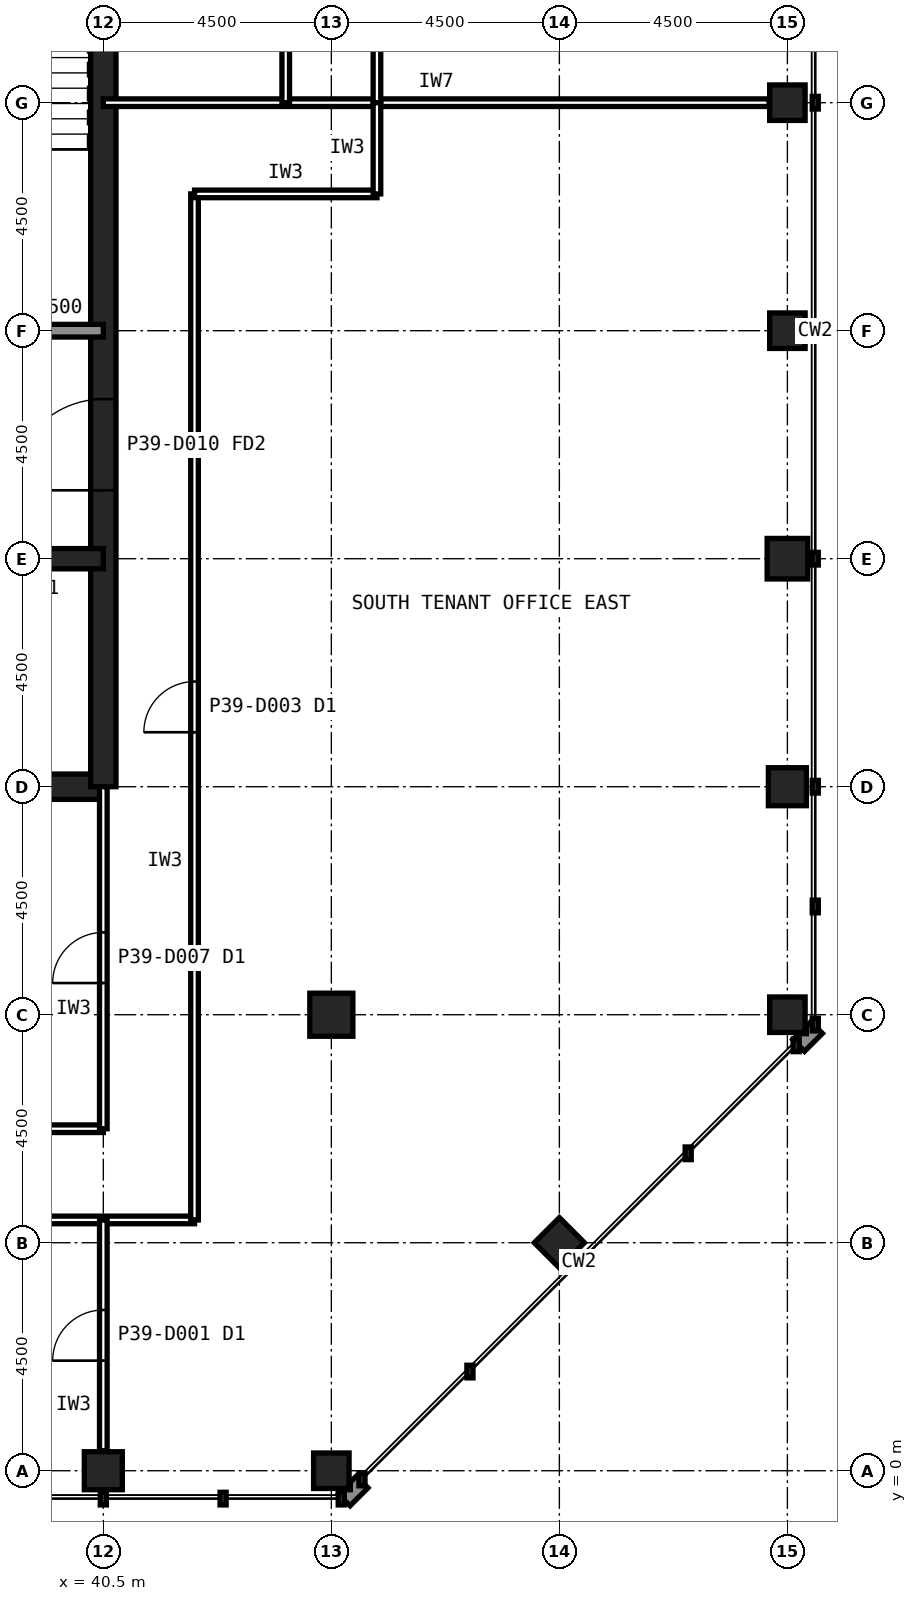
"""IFC4 building model, lengths in metres.
Left out: names, types, materials, properties, quantities, classifications, styles, units other than length and angle.
Written with IfcOpenShell. Run it as: python <this file> out.ifc"""

import sys

from ifc_helpers import new_model, si_unit, direction, frame, frame_2d, origin, origin_2d, place, context, subcontext, project, spatial, rectangle, hollow_rectangle, extrude, element, fill, save


model = new_model("IFC4")
c1 = context("Model", 3, precision=1e-05, world=origin(), true_north=direction((0.0, 1.0)))
c2 = subcontext(c1, "Body", "Model", "MODEL_VIEW")
j1 = project(units=[si_unit("LENGTHUNIT", "METRE"), si_unit("PLANEANGLEUNIT", "RADIAN")], contexts=[c1])
p1 = place(None, origin())
s1 = spatial("IfcSite", under=j1, at=p1, CompositionType="ELEMENT")
p2 = place(p1, origin())
s2 = spatial("IfcBuilding", under=s1, at=p2, CompositionType="ELEMENT")
p3 = place(p2, frame((0.0, 0.0, 167.6)))
s3 = spatial("IfcBuildingStorey", under=s2, at=p3, CompositionType="ELEMENT", Elevation=167.6)
p4 = place(p3, frame((40.5, 0.0, 0.0), z_axis=(0.0, 0.0, 1.0), x_axis=(1.0, 0.0, 0.0)))
e1 = element("IfcColumn", 1, at=p4, inside=s3, PredefinedType="COLUMN", context=c2, shape_type="SweptSolid", body=[
    extrude(hollow_rectangle(XDim=0.75, YDim=0.75, WallThickness=0.04, at=origin_2d()), origin(), (0.0, 0.0, 1.0), 4.0),
])
for number, where, z_axis, x_axis in (
    (2, (45.0, 0.0, 0.0), (0.0, 0.0, 1.0), (1.0, 0.0, 0.0)),
    (3, (54.0, 9.0, 0.0), (0.0, 0.0, 1.0), (1.0, 0.0, 0.0)),
):
    element("IfcColumn", number, at=place(p3, frame(where, z_axis=z_axis, x_axis=x_axis)), inside=s3, PredefinedType="COLUMN", context=c2, shape_type="SweptSolid", body=[
        extrude(hollow_rectangle(XDim=0.7, YDim=0.7, WallThickness=0.036, at=origin_2d()), origin(), (0.0, 0.0, 1.0), 4.0),
    ])
p5 = place(p3, frame((54.0, 13.5, 0.0), z_axis=(0.0, 0.0, 1.0), x_axis=(1.0, 0.0, 0.0)))
e4 = element("IfcColumn", 4, at=p5, inside=s3, PredefinedType="COLUMN", context=c2, shape_type="SweptSolid", body=[
    extrude(hollow_rectangle(XDim=0.75, YDim=0.75, WallThickness=0.04, at=origin_2d()), origin(), (0.0, 0.0, 1.0), 4.0),
])
p6 = place(p3, frame((54.0, 18.0, 0.0), z_axis=(0.0, 0.0, 1.0), x_axis=(1.0, 0.0, 0.0)))
e5 = element("IfcColumn", 5, at=p6, inside=s3, PredefinedType="COLUMN", context=c2, shape_type="SweptSolid", body=[
    extrude(hollow_rectangle(XDim=0.8, YDim=0.8, WallThickness=0.045, at=origin_2d()), origin(), (0.0, 0.0, 1.0), 4.0),
])
for number, where, z_axis, x_axis in (
    (6, (54.0, 22.5, 0.0), (0.0, 0.0, 1.0), (1.0, 0.0, 0.0)),
    (7, (54.0, 27.0, 0.0), (0.0, 0.0, 1.0), (1.0, 0.0, 0.0)),
    (8, (49.5, 4.5, 0.0), (0.0, 0.0, 1.0), (0.707, 0.707, 0.0)),
):
    element("IfcColumn", number, at=place(p3, frame(where, z_axis=z_axis, x_axis=x_axis)), inside=s3, PredefinedType="COLUMN", context=c2, shape_type="SweptSolid", body=[
        extrude(hollow_rectangle(XDim=0.7, YDim=0.7, WallThickness=0.036, at=origin_2d()), origin(), (0.0, 0.0, 1.0), 4.0),
    ])
p7 = place(p3, frame((45.0, 9.0, 0.0), z_axis=(0.0, 0.0, 1.0), x_axis=(1.0, 0.0, 0.0)))
e9 = element("IfcColumn", 9, at=p7, inside=s3, PredefinedType="COLUMN", context=c2, shape_type="SweptSolid", body=[
    extrude(hollow_rectangle(XDim=0.85, YDim=0.85, WallThickness=0.05, at=origin_2d()), origin(), (0.0, 0.0, 1.0), 4.0),
])
p8 = place(p3, frame((13.5, 13.5, 0.0), z_axis=(0.0, 0.0, 1.0), x_axis=(1.0, 0.0, 0.0)))
e10 = element("IfcWall", 10, at=p8, inside=s3, PredefinedType="SHEAR", context=c2, shape_type="SweptSolid", body=[
    extrude(rectangle(XDim=27.0, YDim=0.5, at=frame_2d((13.5, 0.0))), origin(), (0.0, 0.0, 1.0), 4.0),
])
p9 = place(p3, frame((40.5, 13.5, 0.0), z_axis=(0.0, 0.0, 1.0), x_axis=(0.0, 1.0, 0.0)))
e11 = element("IfcWall", 11, at=p9, inside=s3, PredefinedType="SHEAR", context=c2, shape_type="SweptSolid", body=[
    extrude(rectangle(XDim=27.0, YDim=0.5, at=frame_2d((13.5, 0.0))), origin(), (0.0, 0.0, 1.0), 4.0),
])
p10 = place(p9, frame((5.85, 0.0, 0.0)))
e12 = element("IfcOpeningElement", 12, at=p10, cuts=e11, PredefinedType="OPENING", context=c2, shape_type="SweptSolid", body=[
    extrude(rectangle(XDim=1.8, YDim=2.1, at=frame_2d((0.9, 1.05))), frame((0.0, 0.26, 0.0), z_axis=(0.0, -1.0, 0.0), x_axis=(1.0, 0.0, 0.0)), (0.0, 0.0, 1.0), 0.52),
])
p11 = place(p9, frame((19.65, 0.0, 0.0)))
e13 = element("IfcOpeningElement", 13, at=p11, cuts=e11, PredefinedType="OPENING", context=c2, shape_type="SweptSolid", body=[
    extrude(rectangle(XDim=1.2, YDim=2.1, at=frame_2d((0.6, 1.05))), frame((0.0, 0.26, 0.0), z_axis=(0.0, -1.0, 0.0), x_axis=(1.0, 0.0, 0.0)), (0.0, 0.0, 1.0), 0.52),
])
p12 = place(p3, frame((13.5, 18.0, 0.0), z_axis=(0.0, 0.0, 1.0), x_axis=(1.0, 0.0, 0.0)))
e14 = element("IfcWall", 14, at=p12, inside=s3, PredefinedType="SHEAR", context=c2, shape_type="SweptSolid", body=[
    extrude(rectangle(XDim=27.0, YDim=0.4, at=frame_2d((13.5, 0.0))), origin(), (0.0, 0.0, 1.0), 4.0),
])
p13 = place(p12, frame((24.3, 0.0, 0.0)))
e15 = element("IfcOpeningElement", 15, at=p13, cuts=e14, PredefinedType="OPENING", context=c2, shape_type="SweptSolid", body=[
    extrude(rectangle(XDim=0.9, YDim=2.1, at=frame_2d((0.45, 1.05))), frame((0.0, 0.21, 0.0), z_axis=(0.0, -1.0, 0.0), x_axis=(1.0, 0.0, 0.0)), (0.0, 0.0, 1.0), 0.42),
])
p14 = place(p12, frame((5.45, 0.0, 0.0)))
e16 = element("IfcOpeningElement", 16, at=p14, cuts=e14, PredefinedType="OPENING", context=c2, shape_type="SweptSolid", body=[
    extrude(rectangle(XDim=1.1, YDim=2.1, at=frame_2d((0.55, 1.05))), frame((0.0, 0.21, 0.0), z_axis=(0.0, -1.0, 0.0), x_axis=(1.0, 0.0, 0.0)), (0.0, 0.0, 1.0), 0.42),
])
p15 = place(p12, frame((8.45, 0.0, 0.0)))
e17 = element("IfcOpeningElement", 17, at=p15, cuts=e14, PredefinedType="OPENING", context=c2, shape_type="SweptSolid", body=[
    extrude(rectangle(XDim=1.1, YDim=2.1, at=frame_2d((0.55, 1.05))), frame((0.0, 0.21, 0.0), z_axis=(0.0, -1.0, 0.0), x_axis=(1.0, 0.0, 0.0)), (0.0, 0.0, 1.0), 0.42),
])
p16 = place(p12, frame((11.45, 0.0, 0.0)))
e18 = element("IfcOpeningElement", 18, at=p16, cuts=e14, PredefinedType="OPENING", context=c2, shape_type="SweptSolid", body=[
    extrude(rectangle(XDim=1.1, YDim=2.1, at=frame_2d((0.55, 1.05))), frame((0.0, 0.21, 0.0), z_axis=(0.0, -1.0, 0.0), x_axis=(1.0, 0.0, 0.0)), (0.0, 0.0, 1.0), 0.42),
])
p17 = place(p12, frame((14.45, 0.0, 0.0)))
e19 = element("IfcOpeningElement", 19, at=p17, cuts=e14, PredefinedType="OPENING", context=c2, shape_type="SweptSolid", body=[
    extrude(rectangle(XDim=1.1, YDim=2.1, at=frame_2d((0.55, 1.05))), frame((0.0, 0.21, 0.0), z_axis=(0.0, -1.0, 0.0), x_axis=(1.0, 0.0, 0.0)), (0.0, 0.0, 1.0), 0.42),
])
p18 = place(p12, frame((17.45, 0.0, 0.0)))
e20 = element("IfcOpeningElement", 20, at=p18, cuts=e14, PredefinedType="OPENING", context=c2, shape_type="SweptSolid", body=[
    extrude(rectangle(XDim=1.1, YDim=2.1, at=frame_2d((0.55, 1.05))), frame((0.0, 0.21, 0.0), z_axis=(0.0, -1.0, 0.0), x_axis=(1.0, 0.0, 0.0)), (0.0, 0.0, 1.0), 0.42),
])
p19 = place(p12, frame((20.45, 0.0, 0.0)))
e21 = element("IfcOpeningElement", 21, at=p19, cuts=e14, PredefinedType="OPENING", context=c2, shape_type="SweptSolid", body=[
    extrude(rectangle(XDim=1.1, YDim=2.1, at=frame_2d((0.55, 1.05))), frame((0.0, 0.21, 0.0), z_axis=(0.0, -1.0, 0.0), x_axis=(1.0, 0.0, 0.0)), (0.0, 0.0, 1.0), 0.42),
])
p20 = place(p12, frame((1.6, 0.0, 0.0)))
e22 = element("IfcOpeningElement", 22, at=p20, cuts=e14, PredefinedType="OPENING", context=c2, shape_type="SweptSolid", body=[
    extrude(rectangle(XDim=1.3, YDim=2.2, at=frame_2d((0.65, 1.1))), frame((0.0, 0.21, 0.0), z_axis=(0.0, -1.0, 0.0), x_axis=(1.0, 0.0, 0.0)), (0.0, 0.0, 1.0), 0.42),
])
p21 = place(p3, frame((13.5, 22.5, 0.0), z_axis=(0.0, 0.0, 1.0), x_axis=(1.0, 0.0, 0.0)))
e23 = element("IfcWall", 23, at=p21, inside=s3, PredefinedType="SOLIDWALL", context=c2, shape_type="SweptSolid", body=[
    extrude(rectangle(XDim=27.0, YDim=0.25, at=frame_2d((13.5, 0.0))), origin(), (0.0, 0.0, 1.0), 3.84),
])
p22 = place(p21, frame((1.65, 0.0, 0.0)))
e24 = element("IfcOpeningElement", 24, at=p22, cuts=e23, PredefinedType="OPENING", context=c2, shape_type="SweptSolid", body=[
    extrude(rectangle(XDim=1.2, YDim=2.1, at=frame_2d((0.6, 1.05))), frame((0.0, 0.135, 0.0), z_axis=(0.0, -1.0, 0.0), x_axis=(1.0, 0.0, 0.0)), (0.0, 0.0, 1.0), 0.27),
])
p23 = place(p21, frame((6.025, 0.0, 0.0)))
e25 = element("IfcOpeningElement", 25, at=p23, cuts=e23, PredefinedType="OPENING", context=c2, shape_type="SweptSolid", body=[
    extrude(rectangle(XDim=1.0, YDim=2.1, at=frame_2d((0.5, 1.05))), frame((0.0, 0.135, 0.0), z_axis=(0.0, -1.0, 0.0), x_axis=(1.0, 0.0, 0.0)), (0.0, 0.0, 1.0), 0.27),
])
p24 = place(p21, frame((10.525, 0.0, 0.0)))
e26 = element("IfcOpeningElement", 26, at=p24, cuts=e23, PredefinedType="OPENING", context=c2, shape_type="SweptSolid", body=[
    extrude(rectangle(XDim=1.0, YDim=2.1, at=frame_2d((0.5, 1.05))), frame((0.0, 0.135, 0.0), z_axis=(0.0, -1.0, 0.0), x_axis=(1.0, 0.0, 0.0)), (0.0, 0.0, 1.0), 0.27),
])
p25 = place(p21, frame((19.75, 0.0, 0.0)))
e27 = element("IfcOpeningElement", 27, at=p25, cuts=e23, PredefinedType="OPENING", context=c2, shape_type="SweptSolid", body=[
    extrude(rectangle(XDim=1.0, YDim=2.1, at=frame_2d((0.5, 1.05))), frame((0.0, 0.135, 0.0), z_axis=(0.0, -1.0, 0.0), x_axis=(1.0, 0.0, 0.0)), (0.0, 0.0, 1.0), 0.27),
])
p26 = place(p21, frame((15.05, 0.0, 0.0)))
e28 = element("IfcOpeningElement", 28, at=p26, cuts=e23, PredefinedType="OPENING", context=c2, shape_type="SweptSolid", body=[
    extrude(rectangle(XDim=1.4, YDim=2.4, at=frame_2d((0.7, 1.2))), frame((0.0, 0.135, 0.0), z_axis=(0.0, -1.0, 0.0), x_axis=(1.0, 0.0, 0.0)), (0.0, 0.0, 1.0), 0.27),
])
p27 = place(p3, frame((40.5, 27.0, 0.0), z_axis=(0.0, 0.0, 1.0), x_axis=(1.0, 0.0, 0.0)))
e29 = element("IfcWall", 29, at=p27, inside=s3, PredefinedType="PARTITIONING", context=c2, shape_type="SweptSolid", body=[
    extrude(rectangle(XDim=13.14, YDim=0.15, at=frame_2d((6.57, 0.0))), origin(), (0.0, 0.0, 1.0), 2.989),
])
p28 = place(p3, frame((45.9, 27.0, 0.0), z_axis=(0.0, 0.0, 1.0), x_axis=(0.0, 1.0, 0.0)))
e30 = element("IfcWall", 30, at=p28, inside=s3, PredefinedType="PARTITIONING", context=c2, shape_type="SweptSolid", body=[
    extrude(rectangle(XDim=6.3, YDim=0.15, at=frame_2d((3.15, 0.0))), origin(), (0.0, 0.0, 1.0), 3.84),
])
p29 = place(p3, frame((12.315, 4.95, 0.0), z_axis=(0.0, 0.0, 1.0), x_axis=(1.0, 0.0, 0.0)))
e31 = element("IfcWall", 31, at=p29, inside=s3, PredefinedType="PARTITIONING", context=c2, shape_type="SweptSolid", body=[
    extrude(rectangle(XDim=29.985, YDim=0.15, at=frame_2d((14.993, 0.0))), origin(), (0.0, 0.0, 1.0), 3.84),
])
p30 = place(p29, frame((14.86, 0.0, 0.0)))
e32 = element("IfcOpeningElement", 32, at=p30, cuts=e31, PredefinedType="OPENING", context=c2, shape_type="SweptSolid", body=[
    extrude(rectangle(XDim=1.0, YDim=2.1, at=frame_2d((0.5, 1.05))), frame((0.0, 0.085, 0.0), z_axis=(0.0, -1.0, 0.0), x_axis=(1.0, 0.0, 0.0)), (0.0, 0.0, 1.0), 0.17),
])
p31 = place(p3, frame((42.3, 4.95, 0.0), z_axis=(0.0, 0.0, 1.0), x_axis=(0.0, 1.0, 0.0)))
e33 = element("IfcWall", 33, at=p31, inside=s3, PredefinedType="PARTITIONING", context=c2, shape_type="SweptSolid", body=[
    extrude(rectangle(XDim=20.25, YDim=0.15, at=frame_2d((10.125, 0.0))), origin(), (0.0, 0.0, 1.0), 3.84),
])
p32 = place(p31, frame((9.625, 0.0, 0.0)))
e34 = element("IfcOpeningElement", 34, at=p32, cuts=e33, PredefinedType="OPENING", context=c2, shape_type="SweptSolid", body=[
    extrude(rectangle(XDim=1.0, YDim=2.1, at=frame_2d((0.5, 1.05))), frame((0.0, 0.085, 0.0), z_axis=(0.0, -1.0, 0.0), x_axis=(1.0, 0.0, 0.0)), (0.0, 0.0, 1.0), 0.17),
])
p33 = place(p3, frame((42.3, 25.2, 0.0), z_axis=(0.0, 0.0, 1.0), x_axis=(1.0, 0.0, 0.0)))
e35 = element("IfcWall", 35, at=p33, inside=s3, PredefinedType="PARTITIONING", context=c2, shape_type="SweptSolid", body=[
    extrude(rectangle(XDim=3.6, YDim=0.15, at=frame_2d((1.8, 0.0))), origin(), (0.0, 0.0, 1.0), 3.84),
])
p34 = place(p3, frame((45.9, 25.2, 0.0), z_axis=(0.0, 0.0, 1.0), x_axis=(0.0, 1.0, 0.0)))
e36 = element("IfcWall", 36, at=p34, inside=s3, PredefinedType="PARTITIONING", context=c2, shape_type="SweptSolid", body=[
    extrude(rectangle(XDim=1.8, YDim=0.15, at=frame_2d((0.9, 0.0))), origin(), (0.0, 0.0, 1.0), 3.84),
])
p35 = place(p3, frame((31.5, 6.75, 0.0), z_axis=(0.0, 0.0, 1.0), x_axis=(1.0, 0.0, 0.0)))
e37 = element("IfcWall", 37, at=p35, inside=s3, PredefinedType="PARTITIONING", context=c2, shape_type="SweptSolid", body=[
    extrude(rectangle(XDim=9.0, YDim=0.15, at=frame_2d((4.5, 0.0))), origin(), (0.0, 0.0, 1.0), 3.84),
])
p36 = place(p3, frame((40.5, 6.75, 0.0), z_axis=(0.0, 0.0, 1.0), x_axis=(0.0, 1.0, 0.0)))
e38 = element("IfcWall", 38, at=p36, inside=s3, PredefinedType="PARTITIONING", context=c2, shape_type="SweptSolid", body=[
    extrude(rectangle(XDim=6.75, YDim=0.15, at=frame_2d((3.375, 0.0))), origin(), (0.0, 0.0, 1.0), 2.989),
])
p37 = place(p36, frame((2.875, 0.0, 0.0)))
e39 = element("IfcOpeningElement", 39, at=p37, cuts=e38, PredefinedType="OPENING", context=c2, shape_type="SweptSolid", body=[
    extrude(rectangle(XDim=1.0, YDim=2.1, at=frame_2d((0.5, 1.05))), frame((0.0, 0.085, 0.0), z_axis=(0.0, -1.0, 0.0), x_axis=(1.0, 0.0, 0.0)), (0.0, 0.0, 1.0), 0.17),
])
p38 = place(p3, frame((44.1, 27.0, 0.0), z_axis=(0.0, 0.0, 1.0), x_axis=(0.0, 1.0, 0.0)))
e40 = element("IfcWall", 40, at=p38, inside=s3, PredefinedType="PARTITIONING", context=c2, shape_type="SweptSolid", body=[
    extrude(rectangle(XDim=4.5, YDim=0.15, at=frame_2d((2.25, 0.0))), origin(), (0.0, 0.0, 1.0), 3.84),
])
p39 = place(p3, frame((40.5, 0.395, 0.0), z_axis=(0.0, 0.0, 1.0), x_axis=(0.0, 1.0, 0.0)))
e41 = element("IfcWall", 41, at=p39, inside=s3, PredefinedType="PARTITIONING", context=c2, shape_type="SweptSolid", body=[
    extrude(rectangle(XDim=4.555, YDim=0.15, at=frame_2d((2.277, 0.0))), origin(), (0.0, 0.0, 1.0), 2.989),
])
p40 = place(p39, frame((1.778, 0.0, 0.0)))
e42 = element("IfcOpeningElement", 42, at=p40, cuts=e41, PredefinedType="OPENING", context=c2, shape_type="SweptSolid", body=[
    extrude(rectangle(XDim=1.0, YDim=2.1, at=frame_2d((0.5, 1.05))), frame((0.0, 0.085, 0.0), z_axis=(0.0, -1.0, 0.0), x_axis=(1.0, 0.0, 0.0)), (0.0, 0.0, 1.0), 0.17),
])
p41 = place(p10, origin())
e43 = element("IfcDoor", 43, at=p41, inside=s3, OperationType="SINGLE_SWING_LEFT", PredefinedType="DOOR", context=c2, shape_type="SweptSolid", body=[
    extrude(rectangle(XDim=1.8, YDim=2.1, at=frame_2d((0.9, 1.05))), frame((0.0, 0.025, 0.0), z_axis=(0.0, -1.0, 0.0), x_axis=(1.0, 0.0, 0.0)), (0.0, 0.0, 1.0), 0.05),
])
fill(e12, e43)
p42 = place(p32, origin())
e44 = element("IfcDoor", 44, at=p42, inside=s3, OperationType="SINGLE_SWING_LEFT", PredefinedType="DOOR", context=c2, shape_type="SweptSolid", body=[
    extrude(rectangle(XDim=1.0, YDim=2.1, at=frame_2d((0.5, 1.05))), frame((0.0, 0.025, 0.0), z_axis=(0.0, -1.0, 0.0), x_axis=(1.0, 0.0, 0.0)), (0.0, 0.0, 1.0), 0.05),
])
fill(e34, e44)
p43 = place(p37, origin())
e45 = element("IfcDoor", 45, at=p43, inside=s3, OperationType="SINGLE_SWING_LEFT", PredefinedType="DOOR", context=c2, shape_type="SweptSolid", body=[
    extrude(rectangle(XDim=1.0, YDim=2.1, at=frame_2d((0.5, 1.05))), frame((0.0, 0.025, 0.0), z_axis=(0.0, -1.0, 0.0), x_axis=(1.0, 0.0, 0.0)), (0.0, 0.0, 1.0), 0.05),
])
fill(e39, e45)
p44 = place(p40, origin())
e46 = element("IfcDoor", 46, at=p44, inside=s3, OperationType="SINGLE_SWING_LEFT", PredefinedType="DOOR", context=c2, shape_type="SweptSolid", body=[
    extrude(rectangle(XDim=1.0, YDim=2.1, at=frame_2d((0.5, 1.05))), frame((0.0, 0.025, 0.0), z_axis=(0.0, -1.0, 0.0), x_axis=(1.0, 0.0, 0.0)), (0.0, 0.0, 1.0), 0.05),
])
fill(e42, e46)
save(model, sys.argv[1])
